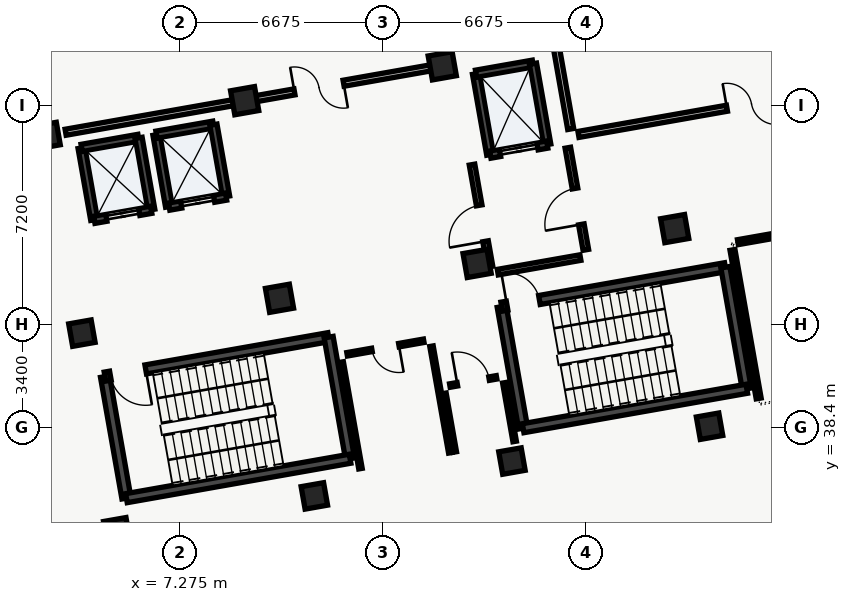
"""IFC4 building model, lengths in metres.
Left out: names, types, materials, properties, quantities, classifications, styles, units other than length and angle.
Written with IfcOpenShell. Run it as: python <this file> out.ifc"""

import sys

from ifc_helpers import new_model, si_unit, direction, frame, frame_2d, origin, origin_2d, place, context, subcontext, project, spatial, rectangle, extrude, element, fill, save


model = new_model("IFC4")
c1 = context("Model", 3, precision=1e-05, world=origin(), true_north=direction((0.0, 1.0)))
c2 = subcontext(c1, "Body", "Model", "MODEL_VIEW")
j1 = project(units=[si_unit("LENGTHUNIT", "METRE"), si_unit("PLANEANGLEUNIT", "RADIAN")], contexts=[c1])
p1 = place(None, origin())
s1 = spatial("IfcSite", under=j1, at=p1, CompositionType="ELEMENT")
p2 = place(p1, origin())
s2 = spatial("IfcBuilding", under=s1, at=p2, CompositionType="ELEMENT")
p3 = place(p2, frame((0.0, 0.0, -4.8)))
s3 = spatial("IfcBuildingStorey", under=s2, at=p3, CompositionType="ELEMENT", Elevation=-4.8)
for number, where, z_axis, x_axis in (
    (1, (5.2, 35.01, 0.0), (0.0, 0.0, 1.0), (0.985, 0.174, 0.0)),
    (2, (4.054, 41.51, 0.0), (0.0, 0.0, 1.0), (0.985, 0.174, 0.0)),
    (3, (2.908, 48.01, 0.0), (0.0, 0.0, 1.0), (0.985, 0.174, 0.0)),
    (4, (11.7, 36.156, 0.0), (0.0, 0.0, 1.0), (0.985, 0.174, 0.0)),
):
    element("IfcColumn", number, at=place(p3, frame(where, z_axis=z_axis, x_axis=x_axis)), inside=s3, PredefinedType="COLUMN", context=c2, shape_type="SweptSolid", body=[
        extrude(rectangle(XDim=0.75, YDim=0.75, at=origin_2d()), origin(), (0.0, 0.0, 1.0), 4.61),
    ])
for number, where, z_axis, x_axis in (
    (5, (10.554, 42.656, 0.0), (0.0, 0.0, 1.0), (0.985, 0.174, 0.0)),
    (6, (9.407, 49.156, 0.0), (0.0, 0.0, 1.0), (0.985, 0.174, 0.0)),
):
    element("IfcColumn", number, at=place(p3, frame(where, z_axis=z_axis, x_axis=x_axis)), inside=s3, PredefinedType="COLUMN", context=c2, shape_type="SweptSolid", body=[
        extrude(rectangle(XDim=0.8, YDim=0.8, at=origin_2d()), origin(), (0.0, 0.0, 1.0), 4.61),
    ])
p4 = place(p3, frame((18.199, 37.302, 0.0), z_axis=(0.0, 0.0, 1.0), x_axis=(0.984807753012, 0.173648177667, 0.0)))
e7 = element("IfcColumn", 7, at=p4, inside=s3, PredefinedType="COLUMN", context=c2, shape_type="SweptSolid", body=[
    extrude(rectangle(XDim=0.75, YDim=0.75, at=origin_2d()), origin(), (0.0, 0.0, 1.0), 4.61),
])
for number, where, z_axis, x_axis in (
    (8, (17.053, 43.802, 0.0), (0.0, 0.0, 1.0), (0.985, 0.174, 0.0)),
    (9, (15.907, 50.302, 0.0), (0.0, 0.0, 1.0), (0.985, 0.174, 0.0)),
):
    element("IfcColumn", number, at=place(p3, frame(where, z_axis=z_axis, x_axis=x_axis)), inside=s3, PredefinedType="COLUMN", context=c2, shape_type="SweptSolid", body=[
        extrude(rectangle(XDim=0.8, YDim=0.8, at=origin_2d()), origin(), (0.0, 0.0, 1.0), 4.61),
    ])
p5 = place(p3, frame((24.699, 38.448, 0.0), z_axis=(0.0, 0.0, 1.0), x_axis=(0.984807753012, 0.173648177667, 0.0)))
e10 = element("IfcColumn", 10, at=p5, inside=s3, PredefinedType="COLUMN", context=c2, shape_type="SweptSolid", body=[
    extrude(rectangle(XDim=0.75, YDim=0.75, at=origin_2d()), origin(), (0.0, 0.0, 1.0), 4.61),
])
p6 = place(p3, frame((23.553, 44.948, 0.0), z_axis=(0.0, 0.0, 1.0), x_axis=(0.984807753012, 0.173648177667, 0.0)))
e11 = element("IfcColumn", 11, at=p6, inside=s3, PredefinedType="COLUMN", context=c2, shape_type="SweptSolid", body=[
    extrude(rectangle(XDim=0.8, YDim=0.8, at=origin_2d()), origin(), (0.0, 0.0, 1.0), 4.61),
])
p7 = place(p3, frame((5.519, 36.082, 0.0), z_axis=(0.0, 0.0, 1.0), x_axis=(-0.173665267602, 0.984804739443, 0.0)))
e12 = element("IfcWall", 12, at=p7, inside=s3, PredefinedType="SHEAR", context=c2, shape_type="SweptSolid", body=[
    extrude(rectangle(XDim=4.06, YDim=0.3, at=frame_2d((2.03, 0.0))), origin(), (0.0, 0.0, 1.0), 4.58),
])
p8 = place(p3, frame((4.814, 40.08, 0.0), z_axis=(0.0, 0.0, 1.0), x_axis=(0.984802636214, 0.173677193974, 0.0)))
e13 = element("IfcWall", 13, at=p8, inside=s3, PredefinedType="SHEAR", context=c2, shape_type="SweptSolid", body=[
    extrude(rectangle(XDim=7.47, YDim=0.3, at=frame_2d((3.735, 0.0))), origin(), (0.0, 0.0, 1.0), 4.58),
])
p9 = place(p8, frame((0.18, 0.0, 0.0)))
e14 = element("IfcOpeningElement", 14, at=p9, cuts=e13, PredefinedType="OPENING", context=c2, shape_type="SweptSolid", body=[
    extrude(rectangle(XDim=1.18, YDim=2.15, at=frame_2d((0.59, 1.075))), frame((0.0, 0.15, 0.0), z_axis=(0.0, -1.0, 0.0), x_axis=(1.0, 0.0, 0.0)), (0.0, 0.0, 1.0), 0.3),
])
p10 = place(p3, frame((12.17, 41.377, 0.0), z_axis=(0.0, 0.0, 1.0), x_axis=(0.173654983803, -0.984806552883, 0.0)))
e15 = element("IfcWall", 15, at=p10, inside=s3, PredefinedType="SHEAR", context=c2, shape_type="SweptSolid", body=[
    extrude(rectangle(XDim=4.06, YDim=0.3, at=frame_2d((2.03, 0.0))), origin(), (0.0, 0.0, 1.0), 4.58),
])
p11 = place(p3, frame((12.875, 37.379, 0.0), z_axis=(0.0, 0.0, 1.0), x_axis=(-0.984808225754, -0.173645496596, 0.0)))
e16 = element("IfcWall", 16, at=p11, inside=s3, PredefinedType="SHEAR", context=c2, shape_type="SweptSolid", body=[
    extrude(rectangle(XDim=7.47, YDim=0.3, at=frame_2d((3.735, 0.0))), origin(), (0.0, 0.0, 1.0), 4.58),
])
p12 = place(p3, frame((18.567, 38.383, 0.0), z_axis=(0.0, 0.0, 1.0), x_axis=(-0.173606946886, 0.984815022221, 0.0)))
e17 = element("IfcWall", 17, at=p12, inside=s3, PredefinedType="SHEAR", context=c2, shape_type="SweptSolid", body=[
    extrude(rectangle(XDim=4.06, YDim=0.3, at=frame_2d((2.03, 0.0))), origin(), (0.0, 0.0, 1.0), 4.58),
])
p13 = place(p3, frame((17.863, 42.381, 0.0), z_axis=(0.0, 0.0, 1.0), x_axis=(0.984808225754, 0.173645496596, 0.0)))
e18 = element("IfcWall", 18, at=p13, inside=s3, PredefinedType="SHEAR", context=c2, shape_type="SweptSolid", body=[
    extrude(rectangle(XDim=7.47, YDim=0.3, at=frame_2d((3.735, 0.0))), origin(), (0.0, 0.0, 1.0), 4.58),
])
p14 = place(p13, frame((0.18, 0.0, 0.0)))
e19 = element("IfcOpeningElement", 19, at=p14, cuts=e18, PredefinedType="OPENING", context=c2, shape_type="SweptSolid", body=[
    extrude(rectangle(XDim=1.08, YDim=2.15, at=frame_2d((0.54, 1.075))), frame((0.0, 0.15, 0.0), z_axis=(0.0, -1.0, 0.0), x_axis=(1.0, 0.0, 0.0)), (0.0, 0.0, 1.0), 0.3),
])
p15 = place(p3, frame((25.219, 43.678, 0.0), z_axis=(0.0, 0.0, 1.0), x_axis=(0.173665267602, -0.984804739443, 0.0)))
e20 = element("IfcWall", 20, at=p15, inside=s3, PredefinedType="SHEAR", context=c2, shape_type="SweptSolid", body=[
    extrude(rectangle(XDim=4.06, YDim=0.3, at=frame_2d((2.03, 0.0))), origin(), (0.0, 0.0, 1.0), 4.58),
])
p16 = place(p3, frame((25.924, 39.68, 0.0), z_axis=(0.0, 0.0, 1.0), x_axis=(-0.984809211193, -0.173639907711, 0.0)))
e21 = element("IfcWall", 21, at=p16, inside=s3, PredefinedType="SHEAR", context=c2, shape_type="SweptSolid", body=[
    extrude(rectangle(XDim=7.47, YDim=0.3, at=frame_2d((3.735, 0.0))), origin(), (0.0, 0.0, 1.0), 4.58),
])
p17 = place(p3, frame((17.488, 47.382, 0.0), z_axis=(0.0, 0.0, 1.0), x_axis=(-0.173615102578, 0.98481358447, 0.0)))
e22 = element("IfcWall", 22, at=p17, inside=s3, PredefinedType="SHEAR", context=c2, shape_type="SweptSolid", body=[
    extrude(rectangle(XDim=2.7, YDim=0.24, at=frame_2d((1.35, 0.0))), origin(), (0.0, 0.0, 1.0), 4.58),
])
p18 = place(p3, frame((17.02, 50.041, 0.0), z_axis=(0.0, 0.0, 1.0), x_axis=(0.984815882103, 0.173602068988, 0.0)))
e23 = element("IfcWall", 23, at=p18, inside=s3, PredefinedType="SHEAR", context=c2, shape_type="SweptSolid", body=[
    extrude(rectangle(XDim=1.9, YDim=0.24, at=frame_2d((0.95, 0.0))), origin(), (0.0, 0.0, 1.0), 4.58),
])
p19 = place(p3, frame((18.891, 50.371, 0.0), z_axis=(0.0, 0.0, 1.0), x_axis=(0.173615102578, -0.98481358447, 0.0)))
e24 = element("IfcWall", 24, at=p19, inside=s3, PredefinedType="SHEAR", context=c2, shape_type="SweptSolid", body=[
    extrude(rectangle(XDim=2.7, YDim=0.24, at=frame_2d((1.35, 0.0))), origin(), (0.0, 0.0, 1.0), 4.58),
])
p20 = place(p3, frame((19.359, 47.712, 0.0), z_axis=(0.0, 0.0, 1.0), x_axis=(-0.984815882103, -0.173602068988, 0.0)))
e25 = element("IfcWall", 25, at=p20, inside=s3, PredefinedType="SHEAR", context=c2, shape_type="SweptSolid", body=[
    extrude(rectangle(XDim=1.9, YDim=0.24, at=frame_2d((0.95, 0.0))), origin(), (0.0, 0.0, 1.0), 4.58),
])
p21 = place(p20, frame((0.325, 0.0, 0.0)))
e26 = element("IfcOpeningElement", 26, at=p21, cuts=e25, PredefinedType="OPENING", context=c2, shape_type="SweptSolid", body=[
    extrude(rectangle(XDim=1.25, YDim=2.2, at=frame_2d((0.625, 1.1))), frame((0.0, 0.12, 0.0), z_axis=(0.0, -1.0, 0.0), x_axis=(1.0, 0.0, 0.0)), (0.0, 0.0, 1.0), 0.24),
])
p22 = place(p3, frame((4.463, 45.237, 0.0), z_axis=(0.0, 0.0, 1.0), x_axis=(-0.173646056486, 0.984808127031, 0.0)))
e27 = element("IfcWall", 27, at=p22, inside=s3, PredefinedType="SHEAR", context=c2, shape_type="SweptSolid", body=[
    extrude(rectangle(XDim=2.4, YDim=0.24, at=frame_2d((1.2, 0.0))), origin(), (0.0, 0.0, 1.0), 4.58),
])
p23 = place(p3, frame((4.046, 47.601, 0.0), z_axis=(0.0, 0.0, 1.0), x_axis=(0.984793905749, 0.173726691098, 0.0)))
e28 = element("IfcWall", 28, at=p23, inside=s3, PredefinedType="SHEAR", context=c2, shape_type="SweptSolid", body=[
    extrude(rectangle(XDim=1.9, YDim=0.24, at=frame_2d((0.95, 0.0))), origin(), (0.0, 0.0, 1.0), 4.58),
])
p24 = place(p3, frame((5.917, 47.931, 0.0), z_axis=(0.0, 0.0, 1.0), x_axis=(0.173646056486, -0.984808127031, 0.0)))
e29 = element("IfcWall", 29, at=p24, inside=s3, PredefinedType="SHEAR", context=c2, shape_type="SweptSolid", body=[
    extrude(rectangle(XDim=2.4, YDim=0.24, at=frame_2d((1.2, 0.0))), origin(), (0.0, 0.0, 1.0), 4.58),
])
p25 = place(p3, frame((6.334, 45.567, 0.0), z_axis=(0.0, 0.0, 1.0), x_axis=(-0.984793905749, -0.173726691098, 0.0)))
e30 = element("IfcWall", 30, at=p25, inside=s3, PredefinedType="SHEAR", context=c2, shape_type="SweptSolid", body=[
    extrude(rectangle(XDim=1.9, YDim=0.24, at=frame_2d((0.95, 0.0))), origin(), (0.0, 0.0, 1.0), 4.58),
])
p26 = place(p25, frame((0.4, 0.0, 0.0)))
e31 = element("IfcOpeningElement", 31, at=p26, cuts=e30, PredefinedType="OPENING", context=c2, shape_type="SweptSolid", body=[
    extrude(rectangle(XDim=1.1, YDim=2.2, at=frame_2d((0.55, 1.1))), frame((0.0, 0.12, 0.0), z_axis=(0.0, -1.0, 0.0), x_axis=(1.0, 0.0, 0.0)), (0.0, 0.0, 1.0), 0.24),
])
p27 = place(p3, frame((6.925, 45.671, 0.0), z_axis=(0.0, 0.0, 1.0), x_axis=(-0.173646056486, 0.984808127031, 0.0)))
e32 = element("IfcWall", 32, at=p27, inside=s3, PredefinedType="SHEAR", context=c2, shape_type="SweptSolid", body=[
    extrude(rectangle(XDim=2.4, YDim=0.24, at=frame_2d((1.2, 0.0))), origin(), (0.0, 0.0, 1.0), 4.58),
])
p28 = place(p3, frame((6.508, 48.035, 0.0), z_axis=(0.0, 0.0, 1.0), x_axis=(0.984793905749, 0.173726691098, 0.0)))
e33 = element("IfcWall", 33, at=p28, inside=s3, PredefinedType="SHEAR", context=c2, shape_type="SweptSolid", body=[
    extrude(rectangle(XDim=1.9, YDim=0.24, at=frame_2d((0.95, 0.0))), origin(), (0.0, 0.0, 1.0), 4.58),
])
p29 = place(p3, frame((8.379, 48.365, 0.0), z_axis=(0.0, 0.0, 1.0), x_axis=(0.173646056486, -0.984808127031, 0.0)))
e34 = element("IfcWall", 34, at=p29, inside=s3, PredefinedType="SHEAR", context=c2, shape_type="SweptSolid", body=[
    extrude(rectangle(XDim=2.4, YDim=0.24, at=frame_2d((1.2, 0.0))), origin(), (0.0, 0.0, 1.0), 4.58),
])
p30 = place(p3, frame((8.796, 46.001, 0.0), z_axis=(0.0, 0.0, 1.0), x_axis=(-0.984793905749, -0.173726691098, 0.0)))
e35 = element("IfcWall", 35, at=p30, inside=s3, PredefinedType="SHEAR", context=c2, shape_type="SweptSolid", body=[
    extrude(rectangle(XDim=1.9, YDim=0.24, at=frame_2d((0.95, 0.0))), origin(), (0.0, 0.0, 1.0), 4.58),
])
p31 = place(p30, frame((0.4, 0.0, 0.0)))
e36 = element("IfcOpeningElement", 36, at=p31, cuts=e35, PredefinedType="OPENING", context=c2, shape_type="SweptSolid", body=[
    extrude(rectangle(XDim=1.1, YDim=2.2, at=frame_2d((0.55, 1.1))), frame((0.0, 0.12, 0.0), z_axis=(0.0, -1.0, 0.0), x_axis=(1.0, 0.0, 0.0)), (0.0, 0.0, 1.0), 0.24),
])
p32 = place(p3, frame((17.733, 43.516, 0.0), z_axis=(0.0, 0.0, 1.0), x_axis=(0.984808483292, 0.173644035992, 0.0)))
e37 = element("IfcWall", 37, at=p32, inside=s3, PredefinedType="SOLIDWALL", context=c2, shape_type="SweptSolid", body=[
    extrude(rectangle(XDim=2.76, YDim=0.185, at=frame_2d((1.38, 0.0))), origin(), (0.0, 0.0, 1.0), 4.25),
])
p33 = place(p3, frame((20.63, 44.25, 0.0), z_axis=(0.0, 0.0, 1.0), x_axis=(-0.173621956536, 0.984812376145, 0.0)))
e38 = element("IfcWall", 38, at=p33, inside=s3, PredefinedType="SOLIDWALL", context=c2, shape_type="SweptSolid", body=[
    extrude(rectangle(XDim=3.41, YDim=0.185, at=frame_2d((1.705, 0.0))), origin(), (0.0, 0.0, 1.0), 4.25),
])
p34 = place(p33, frame((0.85, 0.0, 0.0)))
e39 = element("IfcOpeningElement", 39, at=p34, cuts=e38, PredefinedType="OPENING", context=c2, shape_type="SweptSolid", body=[
    extrude(rectangle(XDim=1.2, YDim=2.15, at=frame_2d((0.6, 1.075))), frame((0.0, 0.093, 0.0), z_axis=(0.0, -1.0, 0.0), x_axis=(1.0, 0.0, 0.0)), (0.0, 0.0, 1.0), 0.185),
])
p35 = place(p3, frame((16.886, 47.052, 0.0), z_axis=(0.0, 0.0, 1.0), x_axis=(0.173621956536, -0.984812376145, 0.0)))
e40 = element("IfcWall", 40, at=p35, inside=s3, PredefinedType="SOLIDWALL", context=c2, shape_type="SweptSolid", body=[
    extrude(rectangle(XDim=3.41, YDim=0.185, at=frame_2d((1.705, 0.0))), origin(), (0.0, 0.0, 1.0), 4.25),
])
p36 = place(p35, frame((1.36, 0.0, 0.0)))
e41 = element("IfcOpeningElement", 41, at=p36, cuts=e40, PredefinedType="OPENING", context=c2, shape_type="SweptSolid", body=[
    extrude(rectangle(XDim=1.2, YDim=2.15, at=frame_2d((0.6, 1.075))), frame((0.0, 0.093, 0.0), z_axis=(0.0, -1.0, 0.0), x_axis=(1.0, 0.0, 0.0)), (0.0, 0.0, 1.0), 0.185),
])
p37 = place(p3, frame((16.171, 37.574, 0.0), z_axis=(0.0, 0.0, 1.0), x_axis=(-0.173644490041, 0.984808403233, 0.0)))
e42 = element("IfcWall", 42, at=p37, inside=s3, PredefinedType="PARTITIONING", context=c2, shape_type="SweptSolid", body=[
    extrude(rectangle(XDim=3.56, YDim=0.115, at=frame_2d((1.78, 0.0))), origin(), (0.0, 0.0, 1.0), 4.25),
])
p38 = place(p3, frame((15.298, 41.259, 0.0), z_axis=(0.0, 0.0, 1.0), x_axis=(-0.984803714572, -0.17367107924, 0.0)))
e43 = element("IfcWall", 43, at=p38, inside=s3, PredefinedType="PARTITIONING", context=c2, shape_type="SweptSolid", body=[
    extrude(rectangle(XDim=2.56, YDim=0.115, at=frame_2d((1.28, 0.0))), origin(), (0.0, 0.0, 1.0), 4.25),
])
p39 = place(p38, frame((0.83, 0.0, 0.0)))
e44 = element("IfcOpeningElement", 44, at=p39, cuts=e43, PredefinedType="OPENING", context=c2, shape_type="SweptSolid", body=[
    extrude(rectangle(XDim=0.9, YDim=2.1, at=frame_2d((0.45, 1.05))), frame((0.0, 0.058, 0.0), z_axis=(0.0, -1.0, 0.0), x_axis=(1.0, 0.0, 0.0)), (0.0, 0.0, 1.0), 0.115),
])
p40 = place(p3, frame((12.599, 40.559, 0.0), z_axis=(0.0, 0.0, 1.0), x_axis=(0.173644490041, -0.984808403233, 0.0)))
e45 = element("IfcWall", 45, at=p40, inside=s3, PredefinedType="PARTITIONING", context=c2, shape_type="SweptSolid", body=[
    extrude(rectangle(XDim=3.56, YDim=0.115, at=frame_2d((1.78, 0.0))), origin(), (0.0, 0.0, 1.0), 4.25),
])
p41 = place(p3, frame((18.289, 37.948, 0.0), z_axis=(0.0, 0.0, 1.0), x_axis=(-0.173643211285, 0.984808628706, 0.0)))
e46 = element("IfcWall", 46, at=p41, inside=s3, PredefinedType="PARTITIONING", context=c2, shape_type="SweptSolid", body=[
    extrude(rectangle(XDim=1.96, YDim=0.115, at=frame_2d((0.98, 0.0))), origin(), (0.0, 0.0, 1.0), 3.945),
])
p42 = place(p3, frame((17.694, 40.056, 0.0), z_axis=(0.0, 0.0, 1.0), x_axis=(-0.984797734253, -0.173704987291, 0.0)))
e47 = element("IfcWall", 47, at=p42, inside=s3, PredefinedType="PARTITIONING", context=c2, shape_type="SweptSolid", body=[
    extrude(rectangle(XDim=1.56, YDim=0.115, at=frame_2d((0.78, 0.0))), origin(), (0.0, 0.0, 1.0), 4.25),
])
p43 = place(p42, frame((0.25, 0.0, 0.0)))
e48 = element("IfcOpeningElement", 48, at=p43, cuts=e47, PredefinedType="OPENING", context=c2, shape_type="SweptSolid", body=[
    extrude(rectangle(XDim=1.06, YDim=2.12, at=frame_2d((0.53, 1.06))), frame((0.0, 0.058, 0.0), z_axis=(0.0, -1.0, 0.0), x_axis=(1.0, 0.0, 0.0)), (0.0, 0.0, 1.0), 0.115),
])
p44 = place(p3, frame((15.979, 39.53, 0.0), z_axis=(0.0, 0.0, 1.0), x_axis=(0.173643211285, -0.984808628706, 0.0)))
e49 = element("IfcWall", 49, at=p44, inside=s3, PredefinedType="PARTITIONING", context=c2, shape_type="SweptSolid", body=[
    extrude(rectangle(XDim=1.96, YDim=0.115, at=frame_2d((0.98, 0.0))), origin(), (0.0, 0.0, 1.0), 4.25),
])
p45 = place(p3, frame((3.518, 48.117, 0.0), z_axis=(0.0, 0.0, 1.0), x_axis=(0.9848097689, 0.173636744608, 0.0)))
e50 = element("IfcWall", 50, at=p45, inside=s3, PredefinedType="SOLIDWALL", context=c2, shape_type="SweptSolid", body=[
    extrude(rectangle(XDim=12.56, YDim=0.2, at=frame_2d((6.28, 0.0))), origin(), (0.0, 0.0, 1.0), 3.845),
])
p46 = place(p45, frame((7.644, 0.0, 0.0)))
e51 = element("IfcOpeningElement", 51, at=p46, cuts=e50, PredefinedType="OPENING", context=c2, shape_type="SweptSolid", body=[
    extrude(rectangle(XDim=1.64, YDim=2.2, at=frame_2d((0.82, 1.1))), frame((0.0, 0.1, 0.0), z_axis=(0.0, -1.0, 0.0), x_axis=(1.0, 0.0, 0.0)), (0.0, 0.0, 1.0), 0.2),
])
p47 = place(p3, frame((16.066, 50.553, 0.0), z_axis=(0.0, 0.0, 1.0), x_axis=(-0.173649928941, 0.984807444214, 0.0)))
e52 = element("IfcWall", 52, at=p47, inside=s3, PredefinedType="SOLIDWALL", context=c2, shape_type="SweptSolid", body=[
    extrude(rectangle(XDim=5.76, YDim=0.2, at=frame_2d((2.88, 0.0))), origin(), (0.0, 0.0, 1.0), 3.945),
])
p48 = place(p3, frame((20.387, 48.045, 0.0), z_axis=(0.0, 0.0, 1.0), x_axis=(0.984804600273, 0.173666056788, 0.0)))
e53 = element("IfcWall", 53, at=p48, inside=s3, PredefinedType="SOLIDWALL", context=c2, shape_type="SweptSolid", body=[
    extrude(rectangle(XDim=11.56, YDim=0.2, at=frame_2d((5.78, 0.0))), origin(), (0.0, 0.0, 1.0), 4.25),
])
p49 = place(p48, frame((4.96, 0.0, 0.0)))
e54 = element("IfcOpeningElement", 54, at=p49, cuts=e53, PredefinedType="OPENING", context=c2, shape_type="SweptSolid", body=[
    extrude(rectangle(XDim=1.64, YDim=2.2, at=frame_2d((0.82, 1.1))), frame((0.0, 0.1, 0.0), z_axis=(0.0, -1.0, 0.0), x_axis=(1.0, 0.0, 0.0)), (0.0, 0.0, 1.0), 0.2),
])
p50 = place(p3, frame((18.611, 56.851, 0.0), z_axis=(0.0, 0.0, 1.0), x_axis=(0.173656551629, -0.98480627642, 0.0)))
e55 = element("IfcWall", 55, at=p50, inside=s3, PredefinedType="SOLIDWALL", context=c2, shape_type="SweptSolid", body=[
    extrude(rectangle(XDim=8.76, YDim=0.2, at=frame_2d((4.38, 0.0))), origin(), (0.0, 0.0, 1.0), 4.25),
])
p51 = place(p3, frame((42.581, 47.491, 0.0), z_axis=(0.0, 0.0, 1.0), x_axis=(-0.984807256483, -0.173650993599, 0.0)))
e56 = element("IfcWall", 56, at=p51, inside=s3, PredefinedType="PARTITIONING", context=c2, shape_type="SweptSolid", body=[
    extrude(rectangle(XDim=17.21, YDim=0.165, at=frame_2d((8.605, 0.0))), origin(), (0.0, 0.0, 1.0), 4.25),
])
p52 = place(p51, frame((8.0, 0.0, 0.0)))
e57 = element("IfcOpeningElement", 57, at=p52, cuts=e56, PredefinedType="OPENING", context=c2, shape_type="SweptSolid", body=[
    extrude(rectangle(XDim=1.21, YDim=2.16, at=frame_2d((0.605, 1.08))), frame((0.0, 0.083, 0.0), z_axis=(0.0, -1.0, 0.0), x_axis=(1.0, 0.0, 0.0)), (0.0, 0.0, 1.0), 0.165),
])
p53 = place(p3, frame((25.454, 44.247, 0.0), z_axis=(0.0, 0.0, 1.0), x_axis=(0.173658971256, -0.98480584975, 0.0)))
e58 = element("IfcWall", 58, at=p53, inside=s3, PredefinedType="PARTITIONING", context=c2, shape_type="SweptSolid", body=[
    extrude(rectangle(XDim=4.96, YDim=0.165, at=frame_2d((2.48, 0.0))), origin(), (0.0, 0.0, 1.0), 4.25),
])
p54 = place(p9, origin())
e59 = element("IfcDoor", 59, at=p54, inside=s3, OperationType="SINGLE_SWING_RIGHT", PredefinedType="DOOR", context=c2, shape_type="SweptSolid", body=[
    extrude(rectangle(XDim=1.18, YDim=2.15, at=frame_2d((0.59, 1.075))), frame((0.0, 0.025, 0.0), z_axis=(0.0, -1.0, 0.0), x_axis=(1.0, 0.0, 0.0)), (0.0, 0.0, 1.0), 0.05),
])
fill(e14, e59)
p55 = place(p14, origin())
e60 = element("IfcDoor", 60, at=p55, inside=s3, OperationType="SINGLE_SWING_LEFT", PredefinedType="DOOR", context=c2, shape_type="SweptSolid", body=[
    extrude(rectangle(XDim=1.08, YDim=2.15, at=frame_2d((0.54, 1.075))), frame((0.0, 0.025, 0.0), z_axis=(0.0, -1.0, 0.0), x_axis=(1.0, 0.0, 0.0)), (0.0, 0.0, 1.0), 0.05),
])
fill(e19, e60)
p56 = place(p21, origin())
e61 = element("IfcDoor", 61, at=p56, inside=s3, OperationType="SLIDING_TO_RIGHT", PredefinedType="DOOR", context=c2, shape_type="SweptSolid", body=[
    extrude(rectangle(XDim=1.25, YDim=2.2, at=frame_2d((0.625, 1.1))), frame((0.0, 0.025, 0.0), z_axis=(0.0, -1.0, 0.0), x_axis=(1.0, 0.0, 0.0)), (0.0, 0.0, 1.0), 0.05),
])
fill(e26, e61)
p57 = place(p26, origin())
e62 = element("IfcDoor", 62, at=p57, inside=s3, OperationType="SLIDING_TO_LEFT", PredefinedType="DOOR", context=c2, shape_type="SweptSolid", body=[
    extrude(rectangle(XDim=1.1, YDim=2.2, at=frame_2d((0.55, 1.1))), frame((0.0, 0.025, 0.0), z_axis=(0.0, -1.0, 0.0), x_axis=(1.0, 0.0, 0.0)), (0.0, 0.0, 1.0), 0.05),
])
fill(e31, e62)
p58 = place(p31, origin())
e63 = element("IfcDoor", 63, at=p58, inside=s3, OperationType="SLIDING_TO_LEFT", PredefinedType="DOOR", context=c2, shape_type="SweptSolid", body=[
    extrude(rectangle(XDim=1.1, YDim=2.2, at=frame_2d((0.55, 1.1))), frame((0.0, 0.025, 0.0), z_axis=(0.0, -1.0, 0.0), x_axis=(1.0, 0.0, 0.0)), (0.0, 0.0, 1.0), 0.05),
])
fill(e36, e63)
p59 = place(p34, origin())
e64 = element("IfcDoor", 64, at=p59, inside=s3, OperationType="SINGLE_SWING_LEFT", PredefinedType="DOOR", context=c2, shape_type="SweptSolid", body=[
    extrude(rectangle(XDim=1.2, YDim=2.15, at=frame_2d((0.6, 1.075))), frame((0.0, 0.025, 0.0), z_axis=(0.0, -1.0, 0.0), x_axis=(1.0, 0.0, 0.0)), (0.0, 0.0, 1.0), 0.05),
])
fill(e39, e64)
p60 = place(p36, origin())
e65 = element("IfcDoor", 65, at=p60, inside=s3, OperationType="SINGLE_SWING_RIGHT", PredefinedType="DOOR", context=c2, shape_type="SweptSolid", body=[
    extrude(rectangle(XDim=1.2, YDim=2.15, at=frame_2d((0.6, 1.075))), frame((0.0, 0.025, 0.0), z_axis=(0.0, -1.0, 0.0), x_axis=(1.0, 0.0, 0.0)), (0.0, 0.0, 1.0), 0.05),
])
fill(e41, e65)
p61 = place(p39, origin())
e66 = element("IfcDoor", 66, at=p61, inside=s3, OperationType="SINGLE_SWING_LEFT", PredefinedType="DOOR", context=c2, shape_type="SweptSolid", body=[
    extrude(rectangle(XDim=0.9, YDim=2.1, at=frame_2d((0.45, 1.05))), frame((0.0, 0.025, 0.0), z_axis=(0.0, -1.0, 0.0), x_axis=(1.0, 0.0, 0.0)), (0.0, 0.0, 1.0), 0.05),
])
fill(e44, e66)
p62 = place(p43, origin())
e67 = element("IfcDoor", 67, at=p62, inside=s3, OperationType="SINGLE_SWING_RIGHT", PredefinedType="DOOR", context=c2, shape_type="SweptSolid", body=[
    extrude(rectangle(XDim=1.06, YDim=2.12, at=frame_2d((0.53, 1.06))), frame((0.0, 0.025, 0.0), z_axis=(0.0, -1.0, 0.0), x_axis=(1.0, 0.0, 0.0)), (0.0, 0.0, 1.0), 0.05),
])
fill(e48, e67)
p63 = place(p46, origin())
e68 = element("IfcDoor", 68, at=p63, inside=s3, OperationType="DOUBLE_DOOR_SINGLE_SWING", PredefinedType="DOOR", context=c2, shape_type="SweptSolid", body=[
    extrude(rectangle(XDim=1.64, YDim=2.2, at=frame_2d((0.82, 1.1))), frame((0.0, 0.025, 0.0), z_axis=(0.0, -1.0, 0.0), x_axis=(1.0, 0.0, 0.0)), (0.0, 0.0, 1.0), 0.05),
])
fill(e51, e68)
p64 = place(p49, origin())
e69 = element("IfcDoor", 69, at=p64, inside=s3, OperationType="DOUBLE_DOOR_SINGLE_SWING", PredefinedType="DOOR", context=c2, shape_type="SweptSolid", body=[
    extrude(rectangle(XDim=1.64, YDim=2.2, at=frame_2d((0.82, 1.1))), frame((0.0, 0.025, 0.0), z_axis=(0.0, -1.0, 0.0), x_axis=(1.0, 0.0, 0.0)), (0.0, 0.0, 1.0), 0.05),
])
fill(e54, e69)
save(model, sys.argv[1])
